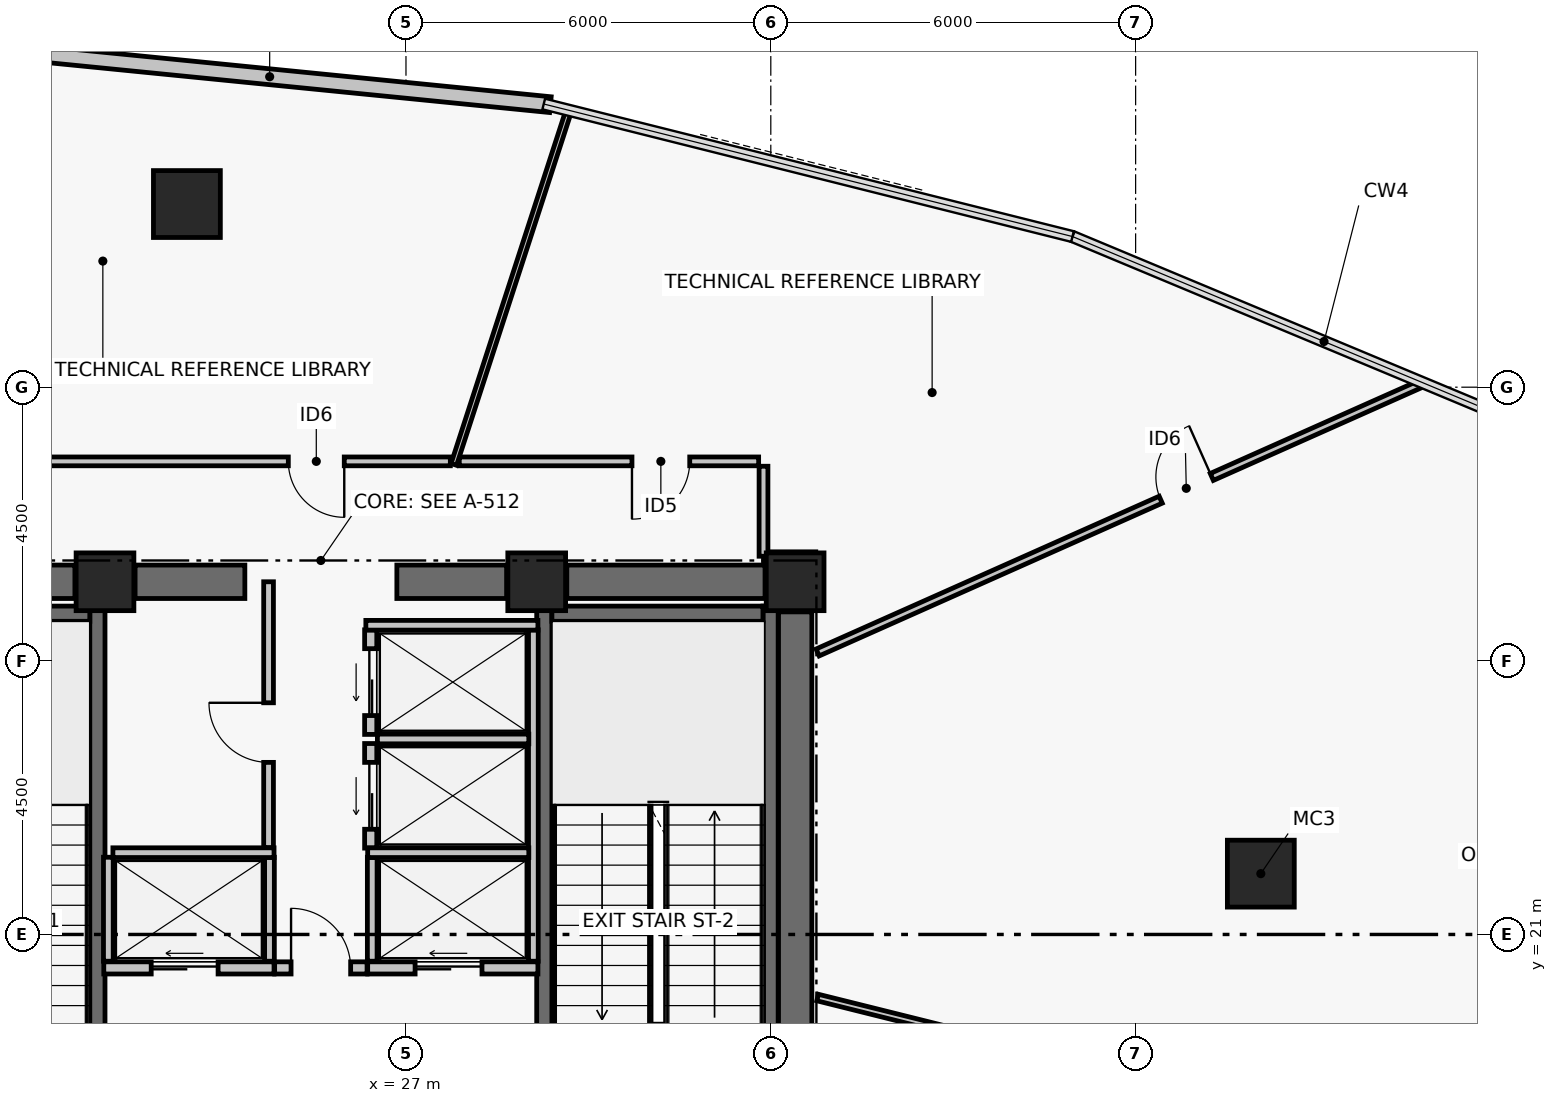
"""IFC4 building model, lengths in metres.
Left out: names, types, materials, properties, quantities, classifications, styles, units other than length and angle.
Written with IfcOpenShell. Run it as: python <this file> out.ifc"""

import sys

from ifc_helpers import new_model, si_unit, direction, frame, frame_2d, origin, origin_2d, place, context, subcontext, project, spatial, rectangle, hollow_rectangle, extrude, element, fill, save


model = new_model("IFC4")
c1 = context("Model", 3, precision=1e-05, world=origin(), true_north=direction((0.0, 1.0)))
c2 = subcontext(c1, "Body", "Model", "MODEL_VIEW")
j1 = project(units=[si_unit("LENGTHUNIT", "METRE"), si_unit("PLANEANGLEUNIT", "RADIAN")], contexts=[c1])
p1 = place(None, origin())
s1 = spatial("IfcSite", under=j1, at=p1, CompositionType="ELEMENT")
p2 = place(p1, origin())
s2 = spatial("IfcBuilding", under=s1, at=p2, CompositionType="ELEMENT")
p3 = place(p2, frame((0.0, 0.0, 165.48)))
s3 = spatial("IfcBuildingStorey", under=s2, at=p3, CompositionType="ELEMENT", Elevation=165.48)
for number, where, z_axis, x_axis in (
    (1, (22.05, 26.8, 0.0), (0.0, 0.0, 1.0), (1.0, 0.0, 0.0)),
    (2, (29.15, 26.8, 0.0), (0.0, 0.0, 1.0), (1.0, 0.0, 0.0)),
    (3, (33.4, 26.8, 0.0), (0.0, 0.0, 1.0), (1.0, 0.0, 0.0)),
):
    element("IfcColumn", number, at=place(p3, frame(where, z_axis=z_axis, x_axis=x_axis)), inside=s3, PredefinedType="COLUMN", context=c2, shape_type="SweptSolid", body=[
        extrude(rectangle(XDim=0.95, YDim=0.95, at=origin_2d()), origin(), (0.0, 0.0, 1.0), 3.72),
    ])
p4 = place(p3, frame((18.295, 26.8, 0.0), z_axis=(0.0, 0.0, 1.0), x_axis=(1.0, 0.0, 0.0)))
e4 = element("IfcWall", 4, at=p4, inside=s3, PredefinedType="SHEAR", context=c2, shape_type="SweptSolid", body=[
    extrude(rectangle(XDim=3.26, YDim=0.55, at=frame_2d((1.63, 0.0))), origin(), (0.0, 0.0, 1.0), 3.5),
])
p5 = place(p3, frame((22.545, 26.8, 0.0), z_axis=(0.0, 0.0, 1.0), x_axis=(1.0, 0.0, 0.0)))
e5 = element("IfcWall", 5, at=p5, inside=s3, PredefinedType="SHEAR", context=c2, shape_type="SweptSolid", body=[
    extrude(rectangle(XDim=1.805, YDim=0.55, at=frame_2d((0.903, 0.0))), origin(), (0.0, 0.0, 1.0), 3.5),
])
p6 = place(p3, frame((26.85, 26.8, 0.0), z_axis=(0.0, 0.0, 1.0), x_axis=(1.0, 0.0, 0.0)))
e6 = element("IfcWall", 6, at=p6, inside=s3, PredefinedType="SHEAR", context=c2, shape_type="SweptSolid", body=[
    extrude(rectangle(XDim=1.805, YDim=0.55, at=frame_2d((0.902, 0.0))), origin(), (0.0, 0.0, 1.0), 3.5),
])
p7 = place(p3, frame((29.645, 26.8, 0.0), z_axis=(0.0, 0.0, 1.0), x_axis=(1.0, 0.0, 0.0)))
e7 = element("IfcWall", 7, at=p7, inside=s3, PredefinedType="SHEAR", context=c2, shape_type="SweptSolid", body=[
    extrude(rectangle(XDim=3.26, YDim=0.55, at=frame_2d((1.63, 0.0))), origin(), (0.0, 0.0, 1.0), 3.5),
])
p8 = place(p3, frame((33.4, 17.695, 0.0), z_axis=(0.0, 0.0, 1.0), x_axis=(0.0, 1.0, 0.0)))
e8 = element("IfcWall", 8, at=p8, inside=s3, PredefinedType="SHEAR", context=c2, shape_type="SweptSolid", body=[
    extrude(rectangle(XDim=8.61, YDim=0.55, at=frame_2d((4.305, 0.0))), origin(), (0.0, 0.0, 1.0), 3.5),
])
p9 = place(p3, frame((21.925, 17.6, 0.0), z_axis=(0.0, 0.0, 1.0), x_axis=(0.0, 1.0, 0.0)))
e9 = element("IfcWall", 9, at=p9, inside=s3, PredefinedType="SHEAR", context=c2, shape_type="SweptSolid", body=[
    extrude(rectangle(XDim=8.8, YDim=0.25, at=frame_2d((4.4, 0.0))), origin(), (0.0, 0.0, 1.0), 3.5),
])
p10 = place(p9, frame((0.35, 0.0, 0.0)))
e10 = element("IfcOpeningElement", 10, at=p10, cuts=e9, PredefinedType="OPENING", context=c2, shape_type="SweptSolid", body=[
    extrude(rectangle(XDim=1.05, YDim=2.08, at=frame_2d((0.525, 1.04))), frame((0.0, 0.135, 0.0), z_axis=(0.0, -1.0, 0.0), x_axis=(1.0, 0.0, 0.0)), (0.0, 0.0, 1.0), 0.27),
])
p11 = place(p3, frame((18.329, 26.275, 0.0), z_axis=(0.0, 0.0, 1.0), x_axis=(1.0, 0.0, 0.0)))
e11 = element("IfcWall", 11, at=p11, inside=s3, PredefinedType="SHEAR", context=c2, shape_type="SweptSolid", body=[
    extrude(rectangle(XDim=3.471, YDim=0.25, at=frame_2d((1.735, 0.0))), origin(), (0.0, 0.0, 1.0), 3.5),
])
p12 = place(p3, frame((29.275, 17.6, 0.0), z_axis=(0.0, 0.0, 1.0), x_axis=(0.0, 1.0, 0.0)))
e12 = element("IfcWall", 12, at=p12, inside=s3, PredefinedType="SHEAR", context=c2, shape_type="SweptSolid", body=[
    extrude(rectangle(XDim=8.8, YDim=0.25, at=frame_2d((4.4, 0.0))), origin(), (0.0, 0.0, 1.0), 3.5),
])
p13 = place(p12, frame((0.35, 0.0, 0.0)))
e13 = element("IfcOpeningElement", 13, at=p13, cuts=e12, PredefinedType="OPENING", context=c2, shape_type="SweptSolid", body=[
    extrude(rectangle(XDim=1.05, YDim=2.08, at=frame_2d((0.525, 1.04))), frame((0.0, 0.135, 0.0), z_axis=(0.0, -1.0, 0.0), x_axis=(1.0, 0.0, 0.0)), (0.0, 0.0, 1.0), 0.27),
])
p14 = place(p3, frame((32.996, 17.6, 0.0), z_axis=(0.0, 0.0, 1.0), x_axis=(0.0, 1.0, 0.0)))
e14 = element("IfcWall", 14, at=p14, inside=s3, PredefinedType="SHEAR", context=c2, shape_type="SweptSolid", body=[
    extrude(rectangle(XDim=8.8, YDim=0.25, at=frame_2d((4.4, 0.0))), origin(), (0.0, 0.0, 1.0), 3.5),
])
p15 = place(p3, frame((29.4, 26.275, 0.0), z_axis=(0.0, 0.0, 1.0), x_axis=(1.0, 0.0, 0.0)))
e15 = element("IfcWall", 15, at=p15, inside=s3, PredefinedType="SHEAR", context=c2, shape_type="SweptSolid", body=[
    extrude(rectangle(XDim=3.471, YDim=0.25, at=frame_2d((1.736, 0.0))), origin(), (0.0, 0.0, 1.0), 3.5),
])
for number, where, z_axis, x_axis in (
    (16, (41.059, 22.0, 0.0), (0.0, 0.0, 1.0), (1.0, 0.0, 0.0)),
    (17, (23.397, 33.012, 0.0), (0.0, 0.0, 1.0), (1.0, 0.0, 0.0)),
):
    element("IfcColumn", number, at=place(p3, frame(where, z_axis=z_axis, x_axis=x_axis)), inside=s3, PredefinedType="COLUMN", context=c2, shape_type="SweptSolid", body=[
        extrude(hollow_rectangle(XDim=1.1, YDim=1.1, WallThickness=0.045, at=origin_2d()), origin(), (0.0, 0.0, 1.0), 3.72),
    ])
p16 = place(p3, frame((20.141, 35.565, 0.0), z_axis=(0.0, 0.0, 1.0), x_axis=(0.9950896707, -0.098977508888, 0.0)))
e18 = element("IfcWall", 18, at=p16, inside=s3, PredefinedType="PARTITIONING", context=c2, shape_type="SweptSolid", body=[
    extrude(rectangle(XDim=9.28, YDim=0.26, at=frame_2d((4.64, 0.0))), origin(), (0.0, 0.0, 1.0), 3.5),
])
p17 = place(p3, frame((24.84, 20.45, 0.0), z_axis=(0.0, 0.0, 1.0), x_axis=(1.0, 0.0, 0.0)))
e19 = element("IfcWall", 19, at=p17, inside=s3, PredefinedType="PARTITIONING", context=c2, shape_type="SweptSolid", body=[
    extrude(rectangle(XDim=1.52, YDim=0.2, at=frame_2d((0.76, 0.0))), origin(), (0.0, 0.0, 1.0), 3.5),
])
p18 = place(p17, frame((0.27, 0.0, 0.0)))
e20 = element("IfcOpeningElement", 20, at=p18, cuts=e19, PredefinedType="OPENING", context=c2, shape_type="SweptSolid", body=[
    extrude(rectangle(XDim=0.98, YDim=2.06, at=frame_2d((0.49, 1.03))), frame((0.0, 0.11, 0.0), z_axis=(0.0, -1.0, 0.0), x_axis=(1.0, 0.0, 0.0)), (0.0, 0.0, 1.0), 0.22),
])
p19 = place(p3, frame((22.03, 20.45, 0.0), z_axis=(0.0, 0.0, 1.0), x_axis=(1.0, 0.0, 0.0)))
e21 = element("IfcWall", 21, at=p19, inside=s3, PredefinedType="PARTITIONING", context=c2, shape_type="SweptSolid", body=[
    extrude(rectangle(XDim=2.8, YDim=0.2, at=frame_2d((1.4, 0.0))), origin(), (0.0, 0.0, 1.0), 3.5),
])
p20 = place(p19, frame((0.78, 0.0, 0.0)))
e22 = element("IfcOpeningElement", 22, at=p20, cuts=e21, PredefinedType="OPENING", context=c2, shape_type="SweptSolid", body=[
    extrude(rectangle(XDim=1.1, YDim=2.08, at=frame_2d((0.55, 1.04))), frame((0.0, 0.11, 0.0), z_axis=(0.0, -1.0, 0.0), x_axis=(1.0, 0.0, 0.0)), (0.0, 0.0, 1.0), 0.22),
])
p21 = place(p3, frame((26.37, 20.45, 0.0), z_axis=(0.0, 0.0, 1.0), x_axis=(1.0, 0.0, 0.0)))
e23 = element("IfcWall", 23, at=p21, inside=s3, PredefinedType="PARTITIONING", context=c2, shape_type="SweptSolid", body=[
    extrude(rectangle(XDim=2.8, YDim=0.2, at=frame_2d((1.4, 0.0))), origin(), (0.0, 0.0, 1.0), 3.5),
])
p22 = place(p21, frame((0.78, 0.0, 0.0)))
e24 = element("IfcOpeningElement", 24, at=p22, cuts=e23, PredefinedType="OPENING", context=c2, shape_type="SweptSolid", body=[
    extrude(rectangle(XDim=1.1, YDim=2.08, at=frame_2d((0.55, 1.04))), frame((0.0, 0.11, 0.0), z_axis=(0.0, -1.0, 0.0), x_axis=(1.0, 0.0, 0.0)), (0.0, 0.0, 1.0), 0.22),
])
p23 = place(p3, frame((26.42, 22.42, 0.0), z_axis=(0.0, 0.0, 1.0), x_axis=(0.0, 1.0, 0.0)))
e25 = element("IfcWall", 25, at=p23, inside=s3, PredefinedType="PARTITIONING", context=c2, shape_type="SweptSolid", body=[
    extrude(rectangle(XDim=1.72, YDim=0.2, at=frame_2d((0.86, 0.0))), origin(), (0.0, 0.0, 1.0), 3.5),
])
p24 = place(p23, frame((0.31, 0.0, 0.0)))
e26 = element("IfcOpeningElement", 26, at=p24, cuts=e25, PredefinedType="OPENING", context=c2, shape_type="SweptSolid", body=[
    extrude(rectangle(XDim=1.1, YDim=2.08, at=frame_2d((0.55, 1.04))), frame((0.0, 0.11, 0.0), z_axis=(0.0, -1.0, 0.0), x_axis=(1.0, 0.0, 0.0)), (0.0, 0.0, 1.0), 0.22),
])
p25 = place(p3, frame((26.42, 24.29, 0.0), z_axis=(0.0, 0.0, 1.0), x_axis=(0.0, 1.0, 0.0)))
e27 = element("IfcWall", 27, at=p25, inside=s3, PredefinedType="PARTITIONING", context=c2, shape_type="SweptSolid", body=[
    extrude(rectangle(XDim=1.72, YDim=0.2, at=frame_2d((0.86, 0.0))), origin(), (0.0, 0.0, 1.0), 3.5),
])
p26 = place(p25, frame((0.31, 0.0, 0.0)))
e28 = element("IfcOpeningElement", 28, at=p26, cuts=e27, PredefinedType="OPENING", context=c2, shape_type="SweptSolid", body=[
    extrude(rectangle(XDim=1.1, YDim=2.08, at=frame_2d((0.55, 1.04))), frame((0.0, 0.11, 0.0), z_axis=(0.0, -1.0, 0.0), x_axis=(1.0, 0.0, 0.0)), (0.0, 0.0, 1.0), 0.22),
])
for number, where, z_axis, x_axis in (
    (29, (22.105, 20.56, 0.0), (0.0, 0.0, 1.0), (0.0, 1.0, 0.0)),
    (30, (24.755, 20.56, 0.0), (0.0, 0.0, 1.0), (0.0, 1.0, 0.0)),
):
    element("IfcWall", number, at=place(p3, frame(where, z_axis=z_axis, x_axis=x_axis)), inside=s3, PredefinedType="PARTITIONING", context=c2, shape_type="SweptSolid", body=[
        extrude(rectangle(XDim=1.71, YDim=0.16, at=frame_2d((0.855, 0.0))), origin(), (0.0, 0.0, 1.0), 3.5),
    ])
p27 = place(p3, frame((22.18, 22.345, 0.0), z_axis=(0.0, 0.0, 1.0), x_axis=(1.0, 0.0, 0.0)))
e31 = element("IfcWall", 31, at=p27, inside=s3, PredefinedType="PARTITIONING", context=c2, shape_type="SweptSolid", body=[
    extrude(rectangle(XDim=2.65, YDim=0.16, at=frame_2d((1.325, 0.0))), origin(), (0.0, 0.0, 1.0), 3.5),
])
p28 = place(p3, frame((29.095, 20.56, 0.0), z_axis=(0.0, 0.0, 1.0), x_axis=(0.0, 1.0, 0.0)))
e32 = element("IfcWall", 32, at=p28, inside=s3, PredefinedType="PARTITIONING", context=c2, shape_type="SweptSolid", body=[
    extrude(rectangle(XDim=5.45, YDim=0.16, at=frame_2d((2.725, 0.0))), origin(), (0.0, 0.0, 1.0), 3.5),
])
p29 = place(p3, frame((26.445, 20.56, 0.0), z_axis=(0.0, 0.0, 1.0), x_axis=(0.0, 1.0, 0.0)))
e33 = element("IfcWall", 33, at=p29, inside=s3, PredefinedType="PARTITIONING", context=c2, shape_type="SweptSolid", body=[
    extrude(rectangle(XDim=1.71, YDim=0.16, at=frame_2d((0.855, 0.0))), origin(), (0.0, 0.0, 1.0), 3.5),
])
p30 = place(p3, frame((26.37, 22.345, 0.0), z_axis=(0.0, 0.0, 1.0), x_axis=(1.0, 0.0, 0.0)))
e34 = element("IfcWall", 34, at=p30, inside=s3, PredefinedType="PARTITIONING", context=c2, shape_type="SweptSolid", body=[
    extrude(rectangle(XDim=2.65, YDim=0.16, at=frame_2d((1.325, 0.0))), origin(), (0.0, 0.0, 1.0), 3.5),
])
p31 = place(p3, frame((26.53, 24.215, 0.0), z_axis=(0.0, 0.0, 1.0), x_axis=(1.0, 0.0, 0.0)))
e35 = element("IfcWall", 35, at=p31, inside=s3, PredefinedType="PARTITIONING", context=c2, shape_type="SweptSolid", body=[
    extrude(rectangle(XDim=2.49, YDim=0.16, at=frame_2d((1.245, 0.0))), origin(), (0.0, 0.0, 1.0), 3.5),
])
p32 = place(p3, frame((26.34, 26.085, 0.0), z_axis=(0.0, 0.0, 1.0), x_axis=(1.0, 0.0, 0.0)))
e36 = element("IfcWall", 36, at=p32, inside=s3, PredefinedType="PARTITIONING", context=c2, shape_type="SweptSolid", body=[
    extrude(rectangle(XDim=2.83, YDim=0.16, at=frame_2d((1.415, 0.0))), origin(), (0.0, 0.0, 1.0), 3.5),
])
p33 = place(p3, frame((24.74, 22.43, 0.0), z_axis=(0.0, 0.0, 1.0), x_axis=(0.0, 1.0, 0.0)))
e37 = element("IfcWall", 37, at=p33, inside=s3, PredefinedType="PARTITIONING", context=c2, shape_type="SweptSolid", body=[
    extrude(rectangle(XDim=4.37, YDim=0.16, at=frame_2d((2.185, 0.0))), origin(), (0.0, 0.0, 1.0), 2.63),
])
p34 = place(p33, frame((1.4, 0.0, 0.0)))
e38 = element("IfcOpeningElement", 38, at=p34, cuts=e37, PredefinedType="OPENING", context=c2, shape_type="SweptSolid", body=[
    extrude(rectangle(XDim=0.98, YDim=2.06, at=frame_2d((0.49, 1.03))), frame((0.0, 0.09, 0.0), z_axis=(0.0, -1.0, 0.0), x_axis=(1.0, 0.0, 0.0)), (0.0, 0.0, 1.0), 0.18),
])
p35 = place(p3, frame((33.74, 27.22, 0.0), z_axis=(0.0, 0.0, 1.0), x_axis=(-1.0, 0.0, 0.0)))
e39 = element("IfcWall", 39, at=p35, inside=s3, PredefinedType="PARTITIONING", context=c2, shape_type="SweptSolid", body=[
    extrude(rectangle(XDim=0.86, YDim=0.145, at=frame_2d((0.43, 0.0))), origin(), (0.0, 0.0, 1.0), 2.63),
])
p36 = place(p3, frame((32.88, 27.22, 0.0), z_axis=(0.0, 0.0, 1.0), x_axis=(0.0, 1.0, 0.0)))
e40 = element("IfcWall", 40, at=p36, inside=s3, PredefinedType="PARTITIONING", context=c2, shape_type="SweptSolid", body=[
    extrude(rectangle(XDim=1.48, YDim=0.145, at=frame_2d((0.74, 0.0))), origin(), (0.0, 0.0, 1.0), 2.63),
])
p37 = place(p3, frame((32.8, 28.78, 0.0), z_axis=(0.0, 0.0, 1.0), x_axis=(-1.0, 0.0, 0.0)))
e41 = element("IfcWall", 41, at=p37, inside=s3, PredefinedType="PARTITIONING", context=c2, shape_type="SweptSolid", body=[
    extrude(rectangle(XDim=4.923, YDim=0.145, at=frame_2d((2.462, 0.0))), origin(), (0.0, 0.0, 1.0), 2.93),
])
p38 = place(p37, frame((1.133, 0.0, 0.0)))
e42 = element("IfcOpeningElement", 42, at=p38, cuts=e41, PredefinedType="OPENING", context=c2, shape_type="SweptSolid", body=[
    extrude(rectangle(XDim=0.95, YDim=2.06, at=frame_2d((0.475, 1.03))), frame((0.0, 0.083, 0.0), z_axis=(0.0, -1.0, 0.0), x_axis=(1.0, 0.0, 0.0)), (0.0, 0.0, 1.0), 0.165),
])
p39 = place(p3, frame((27.729, 28.78, 0.0), z_axis=(0.0, 0.0, 1.0), x_axis=(-1.0, 0.0, 0.0)))
e43 = element("IfcWall", 43, at=p39, inside=s3, PredefinedType="PARTITIONING", context=c2, shape_type="SweptSolid", body=[
    extrude(rectangle(XDim=7.338, YDim=0.145, at=frame_2d((3.669, 0.0))), origin(), (0.0, 0.0, 1.0), 2.73),
])
p40 = place(p39, frame((1.744, 0.0, 0.0)))
e44 = element("IfcOpeningElement", 44, at=p40, cuts=e43, PredefinedType="OPENING", context=c2, shape_type="SweptSolid", body=[
    extrude(rectangle(XDim=0.92, YDim=2.05, at=frame_2d((0.46, 1.025))), frame((0.0, 0.083, 0.0), z_axis=(0.0, -1.0, 0.0), x_axis=(1.0, 0.0, 0.0)), (0.0, 0.0, 1.0), 0.165),
])
p41 = place(p3, frame((33.77, 25.637, 0.0), z_axis=(0.0, 0.0, 1.0), x_axis=(0.913542006179, 0.406744395102, 0.0)))
e45 = element("IfcWall", 45, at=p41, inside=s3, PredefinedType="PARTITIONING", context=c2, shape_type="SweptSolid", body=[
    extrude(rectangle(XDim=10.915, YDim=0.125, at=frame_2d((5.457, 0.0))), origin(), (0.0, 0.0, 1.0), 2.63),
])
p42 = place(p41, frame((6.177, 0.0, 0.0)))
e46 = element("IfcOpeningElement", 46, at=p42, cuts=e45, PredefinedType="OPENING", context=c2, shape_type="SweptSolid", body=[
    extrude(rectangle(XDim=0.92, YDim=2.05, at=frame_2d((0.46, 1.025))), frame((0.0, 0.073, 0.0), z_axis=(0.0, -1.0, 0.0), x_axis=(1.0, 0.0, 0.0)), (0.0, 0.0, 1.0), 0.145),
])
p43 = place(p3, frame((27.787, 28.73, 0.0), z_axis=(0.0, 0.0, 1.0), x_axis=(0.309017664707, 0.951056298491, 0.0)))
e47 = element("IfcWall", 47, at=p43, inside=s3, PredefinedType="PARTITIONING", context=c2, shape_type="SweptSolid", body=[
    extrude(rectangle(XDim=6.133, YDim=0.095, at=frame_2d((3.067, 0.0))), origin(), (0.0, 0.0, 1.0), 2.93),
])
p44 = place(p3, frame((33.77, 19.963, 0.0), z_axis=(0.0, 0.0, 1.0), x_axis=(0.970295996232, -0.241920812863, 0.0)))
e48 = element("IfcWall", 48, at=p44, inside=s3, PredefinedType="PARTITIONING", context=c2, shape_type="SweptSolid", body=[
    extrude(rectangle(XDim=15.138, YDim=0.11, at=frame_2d((7.569, 0.0))), origin(), (0.0, 0.0, 1.0), 2.63),
])
p45 = place(p18, origin())
e49 = element("IfcDoor", 49, at=p45, inside=s3, OperationType="SINGLE_SWING_LEFT", PredefinedType="DOOR", context=c2, shape_type="SweptSolid", body=[
    extrude(rectangle(XDim=0.98, YDim=2.06, at=frame_2d((0.49, 1.03))), frame((0.0, 0.025, 0.0), z_axis=(0.0, -1.0, 0.0), x_axis=(1.0, 0.0, 0.0)), (0.0, 0.0, 1.0), 0.05),
])
fill(e20, e49)
p46 = place(p20, origin())
e50 = element("IfcDoor", 50, at=p46, inside=s3, OperationType="DOUBLE_DOOR_SLIDING", PredefinedType="DOOR", context=c2, shape_type="SweptSolid", body=[
    extrude(rectangle(XDim=1.1, YDim=2.08, at=frame_2d((0.55, 1.04))), frame((0.0, 0.025, 0.0), z_axis=(0.0, -1.0, 0.0), x_axis=(1.0, 0.0, 0.0)), (0.0, 0.0, 1.0), 0.05),
])
fill(e22, e50)
p47 = place(p22, origin())
e51 = element("IfcDoor", 51, at=p47, inside=s3, OperationType="DOUBLE_DOOR_SLIDING", PredefinedType="DOOR", context=c2, shape_type="SweptSolid", body=[
    extrude(rectangle(XDim=1.1, YDim=2.08, at=frame_2d((0.55, 1.04))), frame((0.0, 0.025, 0.0), z_axis=(0.0, -1.0, 0.0), x_axis=(1.0, 0.0, 0.0)), (0.0, 0.0, 1.0), 0.05),
])
fill(e24, e51)
p48 = place(p24, origin())
e52 = element("IfcDoor", 52, at=p48, inside=s3, OperationType="DOUBLE_DOOR_SLIDING", PredefinedType="DOOR", context=c2, shape_type="SweptSolid", body=[
    extrude(rectangle(XDim=1.1, YDim=2.08, at=frame_2d((0.55, 1.04))), frame((0.0, 0.025, 0.0), z_axis=(0.0, -1.0, 0.0), x_axis=(1.0, 0.0, 0.0)), (0.0, 0.0, 1.0), 0.05),
])
fill(e26, e52)
p49 = place(p26, origin())
e53 = element("IfcDoor", 53, at=p49, inside=s3, OperationType="DOUBLE_DOOR_SLIDING", PredefinedType="DOOR", context=c2, shape_type="SweptSolid", body=[
    extrude(rectangle(XDim=1.1, YDim=2.08, at=frame_2d((0.55, 1.04))), frame((0.0, 0.025, 0.0), z_axis=(0.0, -1.0, 0.0), x_axis=(1.0, 0.0, 0.0)), (0.0, 0.0, 1.0), 0.05),
])
fill(e28, e53)
p50 = place(p34, origin())
e54 = element("IfcDoor", 54, at=p50, inside=s3, OperationType="SINGLE_SWING_RIGHT", PredefinedType="DOOR", context=c2, shape_type="SweptSolid", body=[
    extrude(rectangle(XDim=0.98, YDim=2.06, at=frame_2d((0.49, 1.03))), frame((0.0, 0.025, 0.0), z_axis=(0.0, -1.0, 0.0), x_axis=(1.0, 0.0, 0.0)), (0.0, 0.0, 1.0), 0.05),
])
fill(e38, e54)
p51 = place(p38, origin())
e55 = element("IfcDoor", 55, at=p51, inside=s3, OperationType="SINGLE_SWING_RIGHT", PredefinedType="DOOR", context=c2, shape_type="SweptSolid", body=[
    extrude(rectangle(XDim=0.95, YDim=2.06, at=frame_2d((0.475, 1.03))), frame((0.0, 0.025, 0.0), z_axis=(0.0, -1.0, 0.0), x_axis=(1.0, 0.0, 0.0)), (0.0, 0.0, 1.0), 0.05),
])
fill(e42, e55)
p52 = place(p40, origin())
e56 = element("IfcDoor", 56, at=p52, inside=s3, OperationType="SINGLE_SWING_LEFT", PredefinedType="DOOR", context=c2, shape_type="SweptSolid", body=[
    extrude(rectangle(XDim=0.92, YDim=2.05, at=frame_2d((0.46, 1.025))), frame((0.0, 0.025, 0.0), z_axis=(0.0, -1.0, 0.0), x_axis=(1.0, 0.0, 0.0)), (0.0, 0.0, 1.0), 0.05),
])
fill(e44, e56)
p53 = place(p42, origin())
e57 = element("IfcDoor", 57, at=p53, inside=s3, OperationType="SINGLE_SWING_RIGHT", PredefinedType="DOOR", context=c2, shape_type="SweptSolid", body=[
    extrude(rectangle(XDim=0.92, YDim=2.05, at=frame_2d((0.46, 1.025))), frame((0.0, 0.025, 0.0), z_axis=(0.0, -1.0, 0.0), x_axis=(1.0, 0.0, 0.0)), (0.0, 0.0, 1.0), 0.05),
])
fill(e46, e57)
save(model, sys.argv[1])
